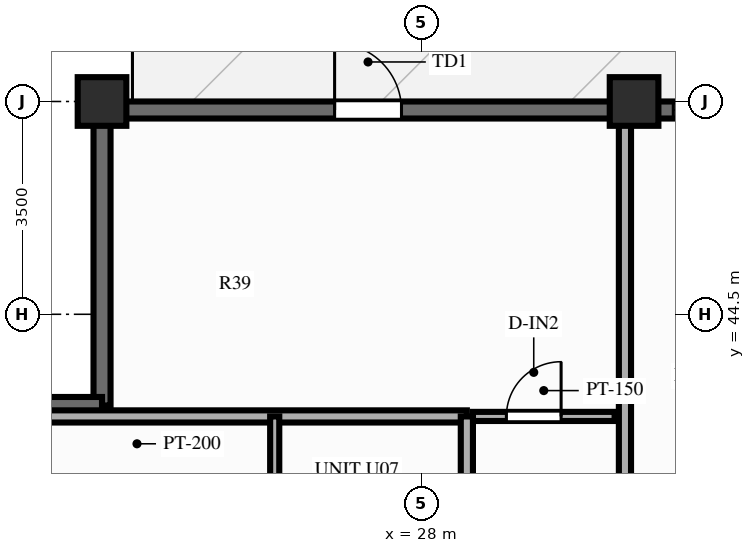
"""IFC4 building model, lengths in metres.
Left out: names, types, materials, properties, quantities, classifications, styles, units other than length and angle.
Written with IfcOpenShell. Run it as: python <this file> out.ifc"""

import sys

from ifc_helpers import new_model, si_unit, direction, frame, frame_2d, origin, origin_2d, place, context, subcontext, project, spatial, rectangle, extrude, source, transform, mapped, element, fill, save


model = new_model("IFC4")
c1 = context("Model", 3, precision=1e-05, world=origin(), true_north=direction((0.0, 1.0)))
c2 = subcontext(c1, "Body", "Model", "MODEL_VIEW")
j1 = project(units=[si_unit("LENGTHUNIT", "METRE"), si_unit("PLANEANGLEUNIT", "RADIAN")], contexts=[c1])
p1 = place(None, origin())
s1 = spatial("IfcSite", under=j1, at=p1, CompositionType="ELEMENT")
p2 = place(p1, origin())
s2 = spatial("IfcBuilding", under=s1, at=p2, CompositionType="ELEMENT")
p3 = place(p2, frame((0.0, 0.0, 182.8)))
s3 = spatial("IfcBuildingStorey", under=s2, at=p3, CompositionType="ELEMENT", Elevation=182.8)
m1 = source(origin(), c2, "Body", "SweptSolid", [
    extrude(rectangle(XDim=0.8, YDim=0.8, at=origin_2d()), origin(), (0.0, 0.0, 1.0), 3.9),
])
for number, where, z_axis, x_axis in (
    (1, (31.5, 48.0, 0.0), (0.0, 0.0, 1.0), (1.0, 0.0, 0.0)),
    (2, (22.75, 48.0, 0.0), (0.0, 0.0, 1.0), (1.0, 0.0, 0.0)),
):
    element("IfcColumn", number, at=place(p3, frame(where, z_axis=z_axis, x_axis=x_axis)), inside=s3, PredefinedType="COLUMN", context=c2, shape_type="MappedRepresentation", body=[
        mapped(m1, transform((0.0, 0.0, 0.0), scale=1.0)),
    ])
p4 = place(p3, frame((22.75, 47.86, 0.0), z_axis=(0.0, 0.0, 1.0), x_axis=(1.0, 0.0, 0.0)))
e3 = element("IfcWall", 3, at=p4, inside=s3, PredefinedType="SOLIDWALL", context=c2, shape_type="SweptSolid", body=[
    extrude(rectangle(XDim=30.5, YDim=0.28, at=frame_2d((15.25, 0.0))), origin(), (0.0, 0.0, 1.0), 2.79),
])
p5 = place(p4, frame((3.825, 0.0, 0.0)))
e4 = element("IfcOpeningElement", 4, at=p5, cuts=e3, PredefinedType="OPENING", context=c2, shape_type="SweptSolid", body=[
    extrude(rectangle(XDim=1.1, YDim=2.15, at=frame_2d((0.55, 1.075))), frame((0.0, 0.152, 0.0), z_axis=(0.0, -1.0, 0.0), x_axis=(1.0, 0.0, 0.0)), (0.0, 0.0, 1.0), 0.304),
])
p6 = place(p4, frame((9.395, 0.0, 0.85)))
e5 = element("IfcOpeningElement", 5, at=p6, cuts=e3, PredefinedType="OPENING", context=c2, shape_type="SweptSolid", body=[
    extrude(rectangle(XDim=0.95, YDim=1.5, at=frame_2d((0.475, 0.75))), frame((0.0, 0.152, 0.0), z_axis=(0.0, -1.0, 0.0), x_axis=(1.0, 0.0, 0.0)), (0.0, 0.0, 1.0), 0.304),
])
p7 = place(p4, frame((11.18, 0.0, 0.85)))
e6 = element("IfcOpeningElement", 6, at=p7, cuts=e3, PredefinedType="OPENING", context=c2, shape_type="SweptSolid", body=[
    extrude(rectangle(XDim=1.5, YDim=1.65, at=frame_2d((0.75, 0.825))), frame((0.0, 0.152, 0.0), z_axis=(0.0, -1.0, 0.0), x_axis=(1.0, 0.0, 0.0)), (0.0, 0.0, 1.0), 0.304),
])
p8 = place(p4, frame((13.594, 0.0, 0.85)))
e7 = element("IfcOpeningElement", 7, at=p8, cuts=e3, PredefinedType="OPENING", context=c2, shape_type="SweptSolid", body=[
    extrude(rectangle(XDim=1.8, YDim=1.65, at=frame_2d((0.9, 0.825))), frame((0.0, 0.152, 0.0), z_axis=(0.0, -1.0, 0.0), x_axis=(1.0, 0.0, 0.0)), (0.0, 0.0, 1.0), 0.304),
])
p9 = place(p4, frame((16.604, 0.0, 0.85)))
e8 = element("IfcOpeningElement", 8, at=p9, cuts=e3, PredefinedType="OPENING", context=c2, shape_type="SweptSolid", body=[
    extrude(rectangle(XDim=1.8, YDim=1.65, at=frame_2d((0.9, 0.825))), frame((0.0, 0.152, 0.0), z_axis=(0.0, -1.0, 0.0), x_axis=(1.0, 0.0, 0.0)), (0.0, 0.0, 1.0), 0.304),
])
p10 = place(p4, frame((19.57, 0.0, 0.85)))
e9 = element("IfcOpeningElement", 9, at=p10, cuts=e3, PredefinedType="OPENING", context=c2, shape_type="SweptSolid", body=[
    extrude(rectangle(XDim=1.5, YDim=1.65, at=frame_2d((0.75, 0.825))), frame((0.0, 0.152, 0.0), z_axis=(0.0, -1.0, 0.0), x_axis=(1.0, 0.0, 0.0)), (0.0, 0.0, 1.0), 0.304),
])
p11 = place(p4, frame((25.225, 0.0, 0.85)))
e10 = element("IfcOpeningElement", 10, at=p11, cuts=e3, PredefinedType="OPENING", context=c2, shape_type="SweptSolid", body=[
    extrude(rectangle(XDim=1.8, YDim=1.65, at=frame_2d((0.9, 0.825))), frame((0.0, 0.152, 0.0), z_axis=(0.0, -1.0, 0.0), x_axis=(1.0, 0.0, 0.0)), (0.0, 0.0, 1.0), 0.304),
])
for number, where, z_axis, x_axis in (
    (11, (22.75, 43.0, 0.0), (0.0, 0.0, 1.0), (0.0, 1.0, 0.0)),
    (12, (17.83, 43.0, 0.0), (0.0, 0.0, 1.0), (1.0, 0.0, 0.0)),
):
    element("IfcWall", number, at=place(p3, frame(where, z_axis=z_axis, x_axis=x_axis)), inside=s3, PredefinedType="SOLIDWALL", context=c2, shape_type="SweptSolid", body=[
        extrude(rectangle(XDim=4.92, YDim=0.28, at=frame_2d((2.46, 0.0))), origin(), (0.0, 0.0, 1.0), 2.79),
    ])
p12 = place(p3, frame((28.85, 42.82, 0.0), z_axis=(0.0, 0.0, 1.0), x_axis=(1.0, 0.0, 0.0)))
e13 = element("IfcWall", 13, at=p12, inside=s3, PredefinedType="PARTITIONING", context=c2, shape_type="SweptSolid", body=[
    extrude(rectangle(XDim=2.33, YDim=0.15, at=frame_2d((1.165, 0.0))), origin(), (0.0, 0.0, 1.0), 3.69),
])
p13 = place(p12, frame((0.55, 0.0, 0.0)))
e14 = element("IfcOpeningElement", 14, at=p13, cuts=e13, PredefinedType="OPENING", context=c2, shape_type="SweptSolid", body=[
    extrude(rectangle(XDim=0.9, YDim=2.1, at=frame_2d((0.45, 1.05))), frame((0.0, 0.087, 0.0), z_axis=(0.0, -1.0, 0.0), x_axis=(1.0, 0.0, 0.0)), (0.0, 0.0, 1.0), 0.174),
])
p14 = place(p3, frame((31.35, 39.05, 0.0), z_axis=(0.0, 0.0, 1.0), x_axis=(0.0, 1.0, 0.0)))
e15 = element("IfcWall", 15, at=p14, inside=s3, PredefinedType="PARTITIONING", context=c2, shape_type="SweptSolid", body=[
    extrude(rectangle(XDim=8.8, YDim=0.2, at=frame_2d((4.4, 0.0))), origin(), (0.0, 0.0, 1.0), 2.79),
])
p15 = place(p3, frame((28.75, 42.82, 0.0), z_axis=(0.0, 0.0, 1.0), x_axis=(-1.0, 0.0, 0.0)))
e16 = element("IfcWall", 16, at=p15, inside=s3, PredefinedType="PARTITIONING", context=c2, shape_type="SweptSolid", body=[
    extrude(rectangle(XDim=10.85, YDim=0.2, at=frame_2d((5.425, 0.0))), origin(), (0.0, 0.0, 1.0), 3.69),
])
p16 = place(p3, frame((28.75, 38.973, 0.0), z_axis=(0.0, 0.0, 1.0), x_axis=(0.0, 1.0, 0.0)))
e17 = element("IfcWall", 17, at=p16, inside=s3, PredefinedType="PARTITIONING", context=c2, shape_type="SweptSolid", body=[
    extrude(rectangle(XDim=3.847, YDim=0.2, at=frame_2d((1.924, 0.0))), origin(), (0.0, 0.0, 1.0), 3.69),
])
p17 = place(p3, frame((25.59, 38.973, 0.0), z_axis=(0.0, 0.0, 1.0), x_axis=(0.0, 1.0, 0.0)))
e18 = element("IfcWall", 18, at=p17, inside=s3, PredefinedType="PARTITIONING", context=c2, shape_type="SweptSolid", body=[
    extrude(rectangle(XDim=3.847, YDim=0.15, at=frame_2d((1.924, 0.0))), origin(), (0.0, 0.0, 1.0), 3.69),
])
m2 = source(origin(), c2, "Body", "SweptSolid", [
    extrude(rectangle(XDim=1.1, YDim=2.15, at=frame_2d((0.55, 1.075))), frame((0.0, 0.025, 0.0), z_axis=(0.0, -1.0, 0.0), x_axis=(1.0, 0.0, 0.0)), (0.0, 0.0, 1.0), 0.05),
])
p18 = place(p5, origin())
e19 = element("IfcDoor", 19, at=p18, inside=s3, OperationType="SINGLE_SWING_LEFT", PredefinedType="DOOR", context=c2, shape_type="MappedRepresentation", body=[
    mapped(m2, transform((0.0, 0.0, 0.0), scale=1.0)),
])
fill(e4, e19)
m3 = source(origin(), c2, "Body", "SweptSolid", [
    extrude(rectangle(XDim=0.95, YDim=1.5, at=frame_2d((0.475, 0.75))), frame((0.0, 0.03, 0.0), z_axis=(0.0, -1.0, 0.0), x_axis=(1.0, 0.0, 0.0)), (0.0, 0.0, 1.0), 0.06),
])
p19 = place(p6, origin())
e20 = element("IfcWindow", 20, at=p19, inside=s3, PartitioningType="SINGLE_PANEL", PredefinedType="WINDOW", context=c2, shape_type="MappedRepresentation", body=[
    mapped(m3, transform((0.0, 0.0, 0.0), scale=1.0)),
])
fill(e5, e20)
m4 = source(origin(), c2, "Body", "SweptSolid", [
    extrude(rectangle(XDim=0.9, YDim=2.1, at=frame_2d((0.45, 1.05))), frame((0.0, 0.025, 0.0), z_axis=(0.0, -1.0, 0.0), x_axis=(1.0, 0.0, 0.0)), (0.0, 0.0, 1.0), 0.05),
])
p20 = place(p13, origin())
e21 = element("IfcDoor", 21, at=p20, inside=s3, OperationType="SINGLE_SWING_RIGHT", PredefinedType="DOOR", context=c2, shape_type="MappedRepresentation", body=[
    mapped(m4, transform((0.0, 0.0, 0.0), scale=1.0)),
])
fill(e14, e21)
save(model, sys.argv[1])
